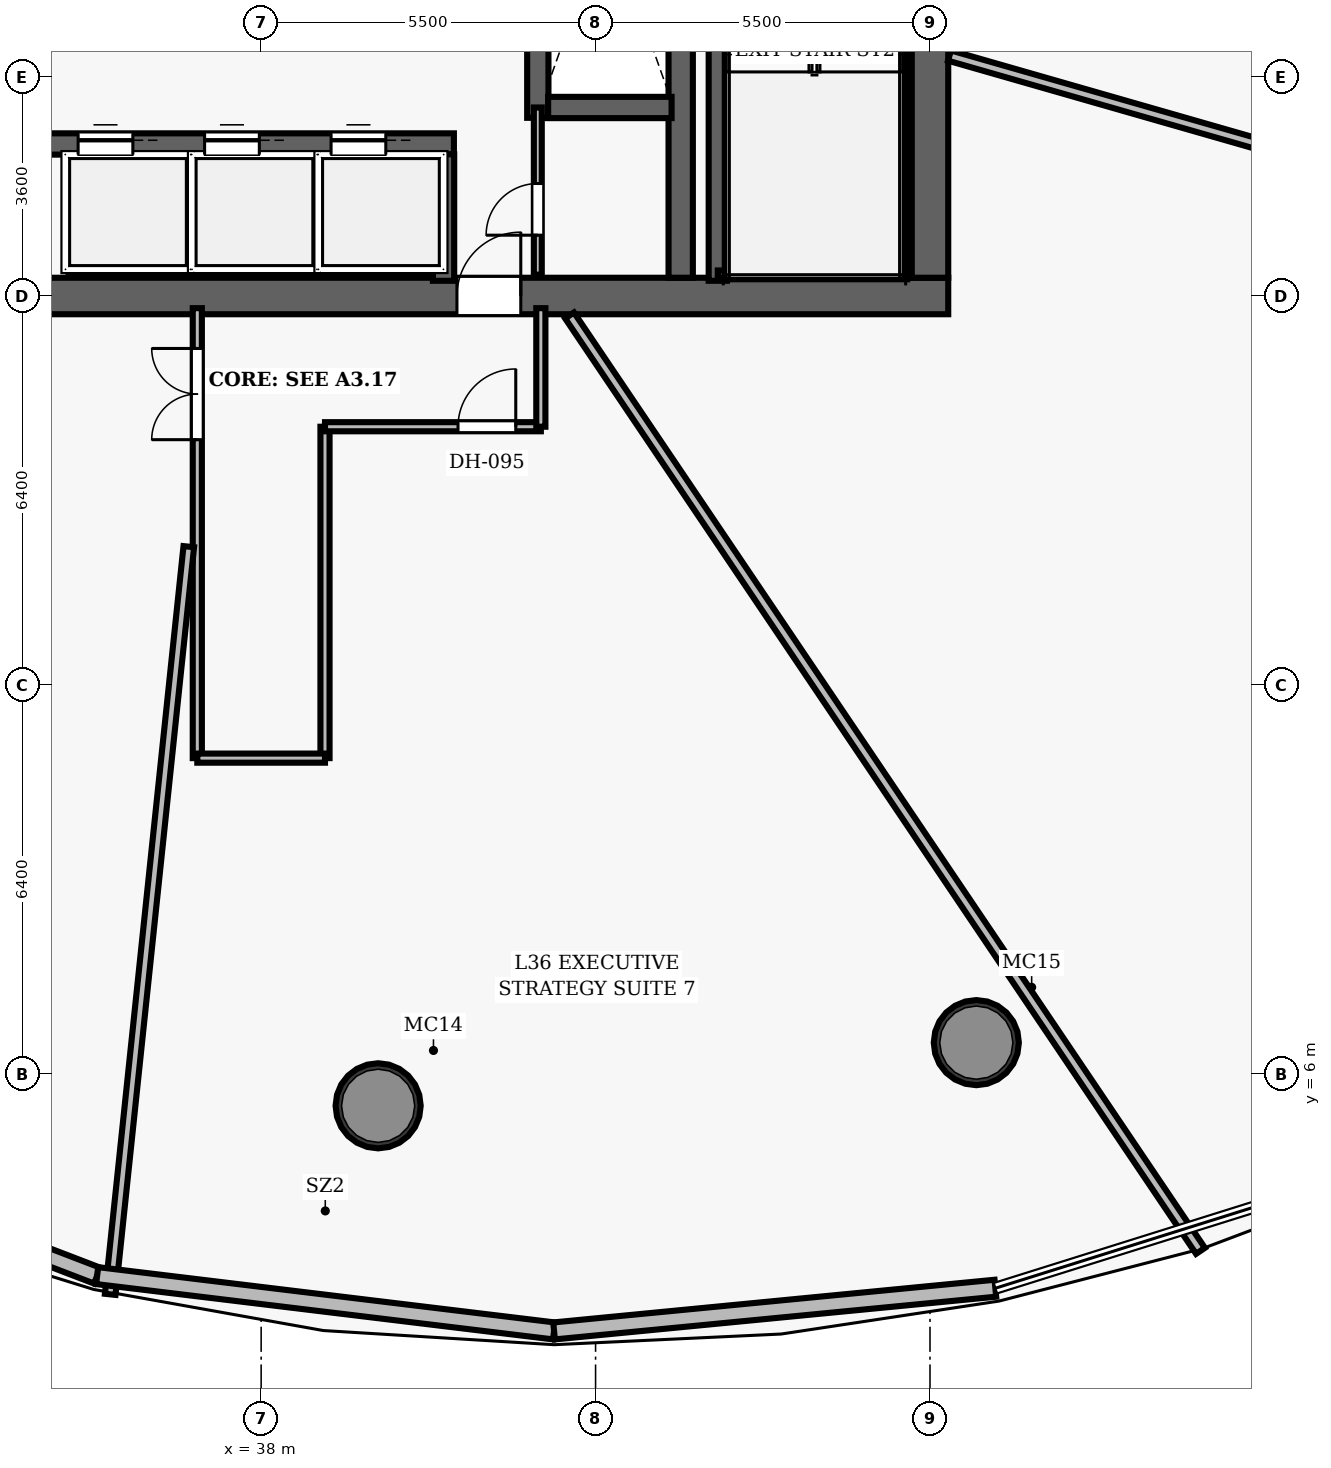
"""IFC4 building model, lengths in metres.
Left out: names, types, materials, properties, quantities, classifications, styles, units other than length and angle.
Written with IfcOpenShell. Run it as: python <this file> out.ifc"""

import sys

from ifc_helpers import new_model, si_unit, direction, frame, frame_2d, origin, origin_2d, place, context, subcontext, project, spatial, rectangle, hollow_circle, extrude, element, fill, save


model = new_model("IFC4")
c1 = context("Model", 3, precision=1e-05, world=origin(), true_north=direction((0.0, 1.0)))
c2 = subcontext(c1, "Body", "Model", "MODEL_VIEW")
j1 = project(units=[si_unit("LENGTHUNIT", "METRE"), si_unit("PLANEANGLEUNIT", "RADIAN")], contexts=[c1])
p1 = place(None, origin())
s1 = spatial("IfcSite", under=j1, at=p1, CompositionType="ELEMENT")
p2 = place(p1, origin())
s2 = spatial("IfcBuilding", under=s1, at=p2, CompositionType="ELEMENT")
p3 = place(p2, frame((0.0, 0.0, 144.8)))
s3 = spatial("IfcBuildingStorey", under=s2, at=p3, CompositionType="ELEMENT", Elevation=144.8)
p4 = place(p3, frame((26.7, 18.8, 0.0), z_axis=(0.0, 0.0, 1.0), x_axis=(1.0, 0.0, 0.0)))
e1 = element("IfcWall", 1, at=p4, inside=s3, PredefinedType="SHEAR", context=c2, shape_type="SweptSolid", body=[
    extrude(rectangle(XDim=22.6, YDim=0.6, at=frame_2d((11.3, 0.0))), origin(), (0.0, 0.0, 1.0), 3.5),
])
p5 = place(p4, frame((14.52, 0.0, 0.0)))
e2 = element("IfcOpeningElement", 2, at=p5, cuts=e1, PredefinedType="OPENING", context=c2, shape_type="SweptSolid", body=[
    extrude(rectangle(XDim=1.05, YDim=2.15, at=frame_2d((0.525, 1.075))), frame((0.0, 0.31, 0.0), z_axis=(0.0, -1.0, 0.0), x_axis=(1.0, 0.0, 0.0)), (0.0, 0.0, 1.0), 0.62),
])
p6 = place(p3, frame((49.0, 19.1, 0.0), z_axis=(0.0, 0.0, 1.0), x_axis=(0.0, 1.0, 0.0)))
e3 = element("IfcWall", 3, at=p6, inside=s3, PredefinedType="SHEAR", context=c2, shape_type="SweptSolid", body=[
    extrude(rectangle(XDim=13.8, YDim=0.6, at=frame_2d((6.9, 0.0))), origin(), (0.0, 0.0, 1.0), 3.5),
])
p7 = place(p6, frame((8.2, 0.0, 0.0)))
e4 = element("IfcOpeningElement", 4, at=p7, cuts=e3, PredefinedType="OPENING", context=c2, shape_type="SweptSolid", body=[
    extrude(rectangle(XDim=1.05, YDim=2.15, at=frame_2d((0.525, 1.075))), frame((0.0, 0.31, 0.0), z_axis=(0.0, -1.0, 0.0), x_axis=(1.0, 0.0, 0.0)), (0.0, 0.0, 1.0), 0.62),
])
p8 = place(p3, frame((44.9, 19.1, 0.0), z_axis=(0.0, 0.0, 1.0), x_axis=(0.0, 1.0, 0.0)))
e5 = element("IfcWall", 5, at=p8, inside=s3, PredefinedType="SHEAR", context=c2, shape_type="SweptSolid", body=[
    extrude(rectangle(XDim=13.8, YDim=0.4, at=frame_2d((6.9, 0.0))), origin(), (0.0, 0.0, 1.0), 3.5),
])
for number, where, z_axis, x_axis in (
    (6, (39.924, 5.483, 0.0), (0.0, 0.0, 1.0), (1.0, 0.0, 0.0)),
    (7, (49.762, 6.521, 0.0), (0.0, 0.0, 1.0), (1.0, 0.0, 0.0)),
):
    element("IfcColumn", number, at=place(p3, frame(where, z_axis=z_axis, x_axis=x_axis)), inside=s3, PredefinedType="COLUMN", context=c2, shape_type="SweptSolid", body=[
        extrude(hollow_circle(Radius=0.7, WallThickness=0.055, at=origin_2d()), origin(), (0.0, 0.0, 1.0), 3.5),
    ])
p9 = place(p3, frame((45.51, 19.05, 0.0), z_axis=(0.0, 0.0, 1.0), x_axis=(0.0, 1.0, 0.0)))
e8 = element("IfcWall", 8, at=p9, inside=s3, PredefinedType="SHEAR", context=c2, shape_type="SweptSolid", body=[
    extrude(rectangle(XDim=7.5, YDim=0.3, at=frame_2d((3.75, 0.0))), origin(), (0.0, 0.0, 1.0), 3.5),
])
p10 = place(p3, frame((48.605, 19.1, 0.0), z_axis=(0.0, 0.0, 1.0), x_axis=(0.0, 1.0, 0.0)))
e9 = element("IfcWall", 9, at=p10, inside=s3, PredefinedType="SHEAR", context=c2, shape_type="SweptSolid", body=[
    extrude(rectangle(XDim=7.45, YDim=0.12, at=frame_2d((3.725, 0.0))), origin(), (0.0, 0.0, 1.0), 3.5),
])
p11 = place(p3, frame((45.51, 19.16, 0.0), z_axis=(0.0, 0.0, 1.0), x_axis=(1.0, 0.0, 0.0)))
e10 = element("IfcWall", 10, at=p11, inside=s3, PredefinedType="SHEAR", context=c2, shape_type="SweptSolid", body=[
    extrude(rectangle(XDim=3.095, YDim=0.12, at=frame_2d((1.547, 0.0))), origin(), (0.0, 0.0, 1.0), 3.5),
])
p12 = place(p3, frame((42.55, 21.73, 0.0), z_axis=(0.0, 0.0, 1.0), x_axis=(0.0, 1.0, 0.0)))
e11 = element("IfcWall", 11, at=p12, inside=s3, PredefinedType="SHEAR", context=c2, shape_type="SweptSolid", body=[
    extrude(rectangle(XDim=6.54, YDim=0.35, at=frame_2d((3.27, 0.0))), origin(), (0.0, 0.0, 1.0), 2.675),
])
p13 = place(p3, frame((42.72, 21.9, 0.0), z_axis=(0.0, 0.0, 1.0), x_axis=(1.0, 0.0, 0.0)))
e12 = element("IfcWall", 12, at=p13, inside=s3, PredefinedType="SHEAR", context=c2, shape_type="SweptSolid", body=[
    extrude(rectangle(XDim=2.03, YDim=0.35, at=frame_2d((1.015, 0.0))), origin(), (0.0, 0.0, 1.0), 2.675),
])
p14 = place(p3, frame((34.49, 21.3, 0.0), z_axis=(0.0, 0.0, 1.0), x_axis=(1.0, 0.0, 0.0)))
e13 = element("IfcWall", 13, at=p14, inside=s3, PredefinedType="SHEAR", context=c2, shape_type="SweptSolid", body=[
    extrude(rectangle(XDim=6.68, YDim=0.35, at=frame_2d((3.34, 0.0))), origin(), (0.0, 0.0, 1.0), 2.675),
])
p15 = place(p14, frame((0.5, 0.0, 0.0)))
e14 = element("IfcOpeningElement", 14, at=p15, cuts=e13, PredefinedType="OPENING", context=c2, shape_type="SweptSolid", body=[
    extrude(rectangle(XDim=0.9, YDim=2.15, at=frame_2d((0.45, 1.075))), frame((0.0, 0.185, 0.0), z_axis=(0.0, -1.0, 0.0), x_axis=(1.0, 0.0, 0.0)), (0.0, 0.0, 1.0), 0.37),
])
p16 = place(p14, frame((2.58, 0.0, 0.0)))
e15 = element("IfcOpeningElement", 15, at=p16, cuts=e13, PredefinedType="OPENING", context=c2, shape_type="SweptSolid", body=[
    extrude(rectangle(XDim=0.9, YDim=2.15, at=frame_2d((0.45, 1.075))), frame((0.0, 0.185, 0.0), z_axis=(0.0, -1.0, 0.0), x_axis=(1.0, 0.0, 0.0)), (0.0, 0.0, 1.0), 0.37),
])
p17 = place(p14, frame((4.66, 0.0, 0.0)))
e16 = element("IfcOpeningElement", 16, at=p17, cuts=e13, PredefinedType="OPENING", context=c2, shape_type="SweptSolid", body=[
    extrude(rectangle(XDim=0.9, YDim=2.15, at=frame_2d((0.45, 1.075))), frame((0.0, 0.185, 0.0), z_axis=(0.0, -1.0, 0.0), x_axis=(1.0, 0.0, 0.0)), (0.0, 0.0, 1.0), 0.37),
])
p18 = place(p3, frame((41.0, 19.05, 0.0), z_axis=(0.0, 0.0, 1.0), x_axis=(0.0, 1.0, 0.0)))
e17 = element("IfcWall", 17, at=p18, inside=s3, PredefinedType="SHEAR", context=c2, shape_type="SweptSolid", body=[
    extrude(rectangle(XDim=2.08, YDim=0.35, at=frame_2d((1.04, 0.0))), origin(), (0.0, 0.0, 1.0), 2.675),
])
p19 = place(p3, frame((42.55, 19.15, 0.0), z_axis=(0.0, 0.0, 1.0), x_axis=(0.0, 1.0, 0.0)))
e18 = element("IfcWall", 18, at=p19, inside=s3, PredefinedType="PARTITIONING", context=c2, shape_type="SweptSolid", body=[
    extrude(rectangle(XDim=2.75, YDim=0.13, at=frame_2d((1.375, 0.0))), origin(), (0.0, 0.0, 1.0), 2.675),
])
p20 = place(p19, frame((0.65, 0.0, 0.0)))
e19 = element("IfcOpeningElement", 19, at=p20, cuts=e18, PredefinedType="OPENING", context=c2, shape_type="SweptSolid", body=[
    extrude(rectangle(XDim=0.85, YDim=2.1, at=frame_2d((0.425, 1.05))), frame((0.0, 0.075, 0.0), z_axis=(0.0, -1.0, 0.0), x_axis=(1.0, 0.0, 0.0)), (0.0, 0.0, 1.0), 0.15),
])
p21 = place(p3, frame((36.95, 11.2, 0.0), z_axis=(0.0, 0.0, 1.0), x_axis=(0.0, 1.0, 0.0)))
e20 = element("IfcWall", 20, at=p21, inside=s3, PredefinedType="PARTITIONING", context=c2, shape_type="SweptSolid", body=[
    extrude(rectangle(XDim=7.4, YDim=0.15, at=frame_2d((3.7, 0.0))), origin(), (0.0, 0.0, 1.0), 2.675),
])
p22 = place(p21, frame((5.237, 0.0, 0.0)))
e21 = element("IfcOpeningElement", 21, at=p22, cuts=e20, PredefinedType="OPENING", context=c2, shape_type="SweptSolid", body=[
    extrude(rectangle(XDim=1.5, YDim=2.2, at=frame_2d((0.75, 1.1))), frame((0.0, 0.085, 0.0), z_axis=(0.0, -1.0, 0.0), x_axis=(1.0, 0.0, 0.0)), (0.0, 0.0, 1.0), 0.17),
])
p23 = place(p3, frame((39.05, 11.2, 0.0), z_axis=(0.0, 0.0, 1.0), x_axis=(0.0, 1.0, 0.0)))
e22 = element("IfcWall", 22, at=p23, inside=s3, PredefinedType="PARTITIONING", context=c2, shape_type="SweptSolid", body=[
    extrude(rectangle(XDim=5.45, YDim=0.15, at=frame_2d((2.725, 0.0))), origin(), (0.0, 0.0, 1.0), 2.675),
])
p24 = place(p3, frame((39.05, 16.65, 0.0), z_axis=(0.0, 0.0, 1.0), x_axis=(1.0, 0.0, 0.0)))
e23 = element("IfcWall", 23, at=p24, inside=s3, PredefinedType="PARTITIONING", context=c2, shape_type="SweptSolid", body=[
    extrude(rectangle(XDim=3.55, YDim=0.15, at=frame_2d((1.775, 0.0))), origin(), (0.0, 0.0, 1.0), 2.675),
])
p25 = place(p24, frame((2.188, 0.0, 0.0)))
e24 = element("IfcOpeningElement", 24, at=p25, cuts=e23, PredefinedType="OPENING", context=c2, shape_type="SweptSolid", body=[
    extrude(rectangle(XDim=0.95, YDim=2.15, at=frame_2d((0.475, 1.075))), frame((0.0, 0.085, 0.0), z_axis=(0.0, -1.0, 0.0), x_axis=(1.0, 0.0, 0.0)), (0.0, 0.0, 1.0), 0.17),
])
p26 = place(p3, frame((42.6, 16.65, 0.0), z_axis=(0.0, 0.0, 1.0), x_axis=(0.0, 1.0, 0.0)))
e25 = element("IfcWall", 25, at=p26, inside=s3, PredefinedType="PARTITIONING", context=c2, shape_type="SweptSolid", body=[
    extrude(rectangle(XDim=1.95, YDim=0.15, at=frame_2d((0.975, 0.0))), origin(), (0.0, 0.0, 1.0), 2.675),
])
p27 = place(p3, frame((36.95, 11.2, 0.0), z_axis=(0.0, 0.0, 1.0), x_axis=(1.0, 0.0, 0.0)))
e26 = element("IfcWall", 26, at=p27, inside=s3, PredefinedType="PARTITIONING", context=c2, shape_type="SweptSolid", body=[
    extrude(rectangle(XDim=2.1, YDim=0.15, at=frame_2d((1.05, 0.0))), origin(), (0.0, 0.0, 1.0), 2.675),
])
p28 = place(p3, frame((36.81, 14.678, 0.0), z_axis=(0.0, 0.0, 1.0), x_axis=(-0.104534714601, -0.994521238307, 0.0)))
e27 = element("IfcWall", 27, at=p28, inside=s3, PredefinedType="PARTITIONING", context=c2, shape_type="SweptSolid", body=[
    extrude(rectangle(XDim=12.364, YDim=0.175, at=frame_2d((6.182, 0.0))), origin(), (0.0, 0.0, 1.0), 2.675),
])
p29 = place(p3, frame((43.072, 18.48, 0.0), z_axis=(0.0, 0.0, 1.0), x_axis=(0.559194878042, -0.829036240687, 0.0)))
e28 = element("IfcWall", 28, at=p29, inside=s3, PredefinedType="PARTITIONING", context=c2, shape_type="SweptSolid", body=[
    extrude(rectangle(XDim=18.556, YDim=0.175, at=frame_2d((9.278, 0.0))), origin(), (0.0, 0.0, 1.0), 2.675),
])
p30 = place(p3, frame((49.32, 22.754, 0.0), z_axis=(0.0, 0.0, 1.0), x_axis=(0.961264573676, -0.275627319757, 0.0)))
e29 = element("IfcWall", 29, at=p30, inside=s3, PredefinedType="PARTITIONING", context=c2, shape_type="SweptSolid", body=[
    extrude(rectangle(XDim=17.931, YDim=0.175, at=frame_2d((8.966, 0.0))), origin(), (0.0, 0.0, 1.0), 2.675),
])
p31 = place(p3, frame((35.303, 2.69, 0.0), z_axis=(0.0, 0.0, 1.0), x_axis=(-0.933561033941, 0.358418464796, 0.0)))
e30 = element("IfcWall", 30, at=p31, inside=s3, PredefinedType="SOLIDWALL", context=c2, shape_type="SweptSolid", body=[
    extrude(rectangle(XDim=7.617, YDim=0.28, at=frame_2d((3.809, 0.0))), origin(), (0.0, 0.0, 1.0), 3.26),
])
p32 = place(p3, frame((42.817, 1.781, 0.0), z_axis=(0.0, 0.0, 1.0), x_axis=(-0.992759912425, 0.120115595499, 0.0)))
e31 = element("IfcWall", 31, at=p32, inside=s3, PredefinedType="SOLIDWALL", context=c2, shape_type="SweptSolid", body=[
    extrude(rectangle(XDim=7.569, YDim=0.28, at=frame_2d((3.785, 0.0))), origin(), (0.0, 0.0, 1.0), 3.26),
])
p33 = place(p3, frame((50.075, 2.482, 0.0), z_axis=(0.0, 0.0, 1.0), x_axis=(-0.995356431411, -0.096257853958, 0.0)))
e32 = element("IfcWall", 32, at=p33, inside=s3, PredefinedType="SOLIDWALL", context=c2, shape_type="SweptSolid", body=[
    extrude(rectangle(XDim=7.292, YDim=0.28, at=frame_2d((3.646, 0.0))), origin(), (0.0, 0.0, 1.0), 3.26),
])
p34 = place(p5, origin())
e33 = element("IfcDoor", 33, at=p34, inside=s3, OperationType="SINGLE_SWING_RIGHT", PredefinedType="DOOR", context=c2, shape_type="SweptSolid", body=[
    extrude(rectangle(XDim=1.05, YDim=2.15, at=frame_2d((0.525, 1.075))), frame((0.0, 0.025, 0.0), z_axis=(0.0, -1.0, 0.0), x_axis=(1.0, 0.0, 0.0)), (0.0, 0.0, 1.0), 0.05),
])
fill(e2, e33)
p35 = place(p20, origin())
e34 = element("IfcDoor", 34, at=p35, inside=s3, OperationType="SINGLE_SWING_LEFT", PredefinedType="DOOR", context=c2, shape_type="SweptSolid", body=[
    extrude(rectangle(XDim=0.85, YDim=2.1, at=frame_2d((0.425, 1.05))), frame((0.0, 0.025, 0.0), z_axis=(0.0, -1.0, 0.0), x_axis=(1.0, 0.0, 0.0)), (0.0, 0.0, 1.0), 0.05),
])
fill(e19, e34)
p36 = place(p22, origin())
e35 = element("IfcDoor", 35, at=p36, inside=s3, OperationType="DOUBLE_DOOR_SINGLE_SWING", PredefinedType="DOOR", context=c2, shape_type="SweptSolid", body=[
    extrude(rectangle(XDim=1.5, YDim=2.2, at=frame_2d((0.75, 1.1))), frame((0.0, 0.025, 0.0), z_axis=(0.0, -1.0, 0.0), x_axis=(1.0, 0.0, 0.0)), (0.0, 0.0, 1.0), 0.05),
])
fill(e21, e35)
p37 = place(p25, origin())
e36 = element("IfcDoor", 36, at=p37, inside=s3, OperationType="SINGLE_SWING_RIGHT", PredefinedType="DOOR", context=c2, shape_type="SweptSolid", body=[
    extrude(rectangle(XDim=0.95, YDim=2.15, at=frame_2d((0.475, 1.075))), frame((0.0, 0.025, 0.0), z_axis=(0.0, -1.0, 0.0), x_axis=(1.0, 0.0, 0.0)), (0.0, 0.0, 1.0), 0.05),
])
fill(e24, e36)
p38 = place(p15, origin())
e37 = element("IfcDoor", 37, at=p38, inside=s3, OperationType="SLIDING_TO_LEFT", PredefinedType="DOOR", context=c2, shape_type="SweptSolid", body=[
    extrude(rectangle(XDim=0.9, YDim=2.15, at=frame_2d((0.45, 1.075))), frame((0.0, 0.025, 0.0), z_axis=(0.0, -1.0, 0.0), x_axis=(1.0, 0.0, 0.0)), (0.0, 0.0, 1.0), 0.05),
])
fill(e14, e37)
p39 = place(p16, origin())
e38 = element("IfcDoor", 38, at=p39, inside=s3, OperationType="SLIDING_TO_LEFT", PredefinedType="DOOR", context=c2, shape_type="SweptSolid", body=[
    extrude(rectangle(XDim=0.9, YDim=2.15, at=frame_2d((0.45, 1.075))), frame((0.0, 0.025, 0.0), z_axis=(0.0, -1.0, 0.0), x_axis=(1.0, 0.0, 0.0)), (0.0, 0.0, 1.0), 0.05),
])
fill(e15, e38)
p40 = place(p17, origin())
e39 = element("IfcDoor", 39, at=p40, inside=s3, OperationType="SLIDING_TO_LEFT", PredefinedType="DOOR", context=c2, shape_type="SweptSolid", body=[
    extrude(rectangle(XDim=0.9, YDim=2.15, at=frame_2d((0.45, 1.075))), frame((0.0, 0.025, 0.0), z_axis=(0.0, -1.0, 0.0), x_axis=(1.0, 0.0, 0.0)), (0.0, 0.0, 1.0), 0.05),
])
fill(e16, e39)
save(model, sys.argv[1])
